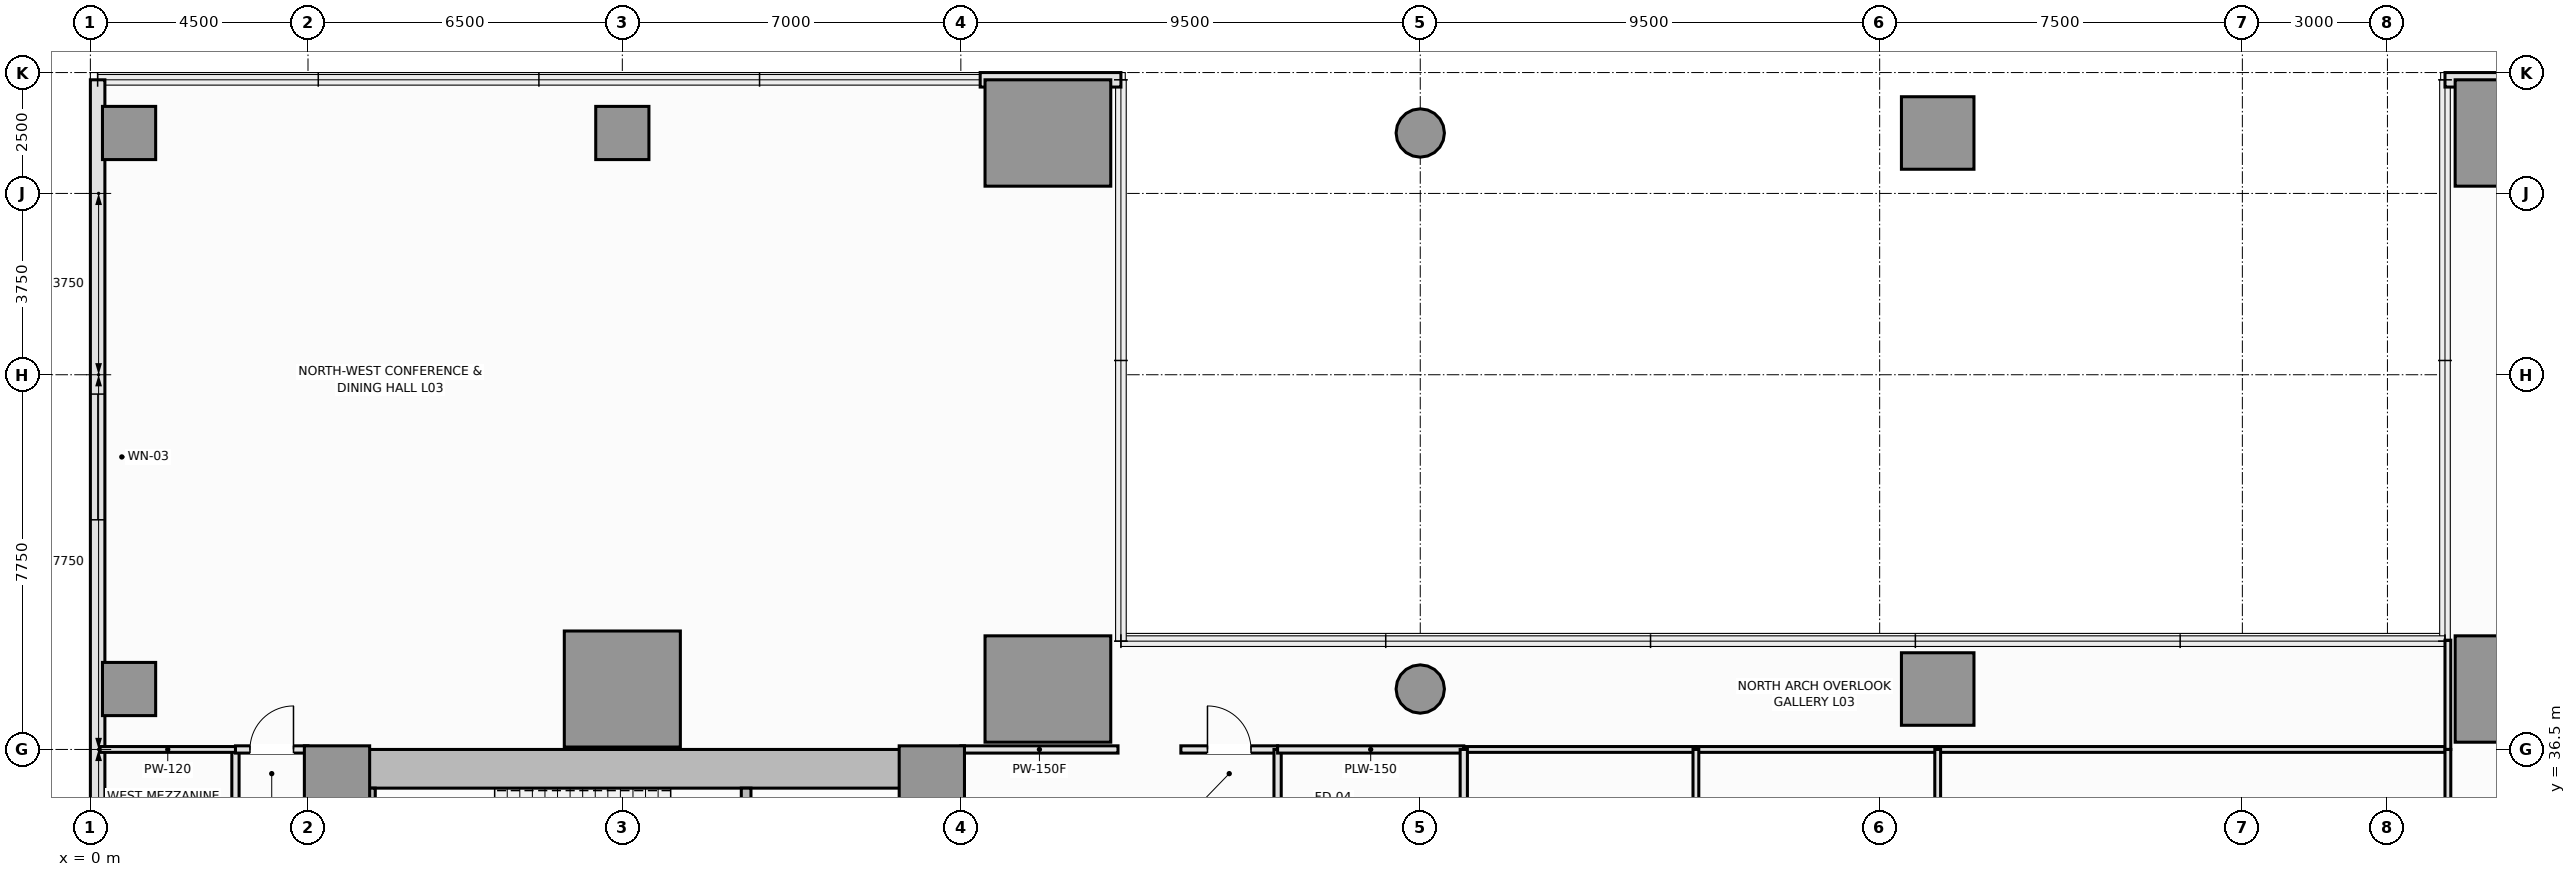
"""IFC4 building model, lengths in metres.
Left out: names, types, materials, properties, quantities, classifications, styles, units other than length and angle.
Written with IfcOpenShell. Run it as: python <this file> out.ifc"""

import sys

from ifc_helpers import new_model, si_unit, direction, frame, frame_2d, origin, origin_2d, place, context, subcontext, project, spatial, rectangle, circle, extrude, element, fill, save


model = new_model("IFC4")
c1 = context("Model", 3, precision=1e-05, world=origin(), true_north=direction((0.0, 1.0)))
c2 = subcontext(c1, "Body", "Model", "MODEL_VIEW")
j1 = project(units=[si_unit("LENGTHUNIT", "METRE"), si_unit("PLANEANGLEUNIT", "RADIAN")], contexts=[c1])
p1 = place(None, origin())
s1 = spatial("IfcSite", under=j1, at=p1, CompositionType="ELEMENT")
p2 = place(p1, origin())
s2 = spatial("IfcBuilding", under=s1, at=p2, CompositionType="ELEMENT")
p3 = place(p2, frame((0.0, 0.0, 15.6)))
s3 = spatial("IfcBuildingStorey", under=s2, at=p3, CompositionType="ELEMENT", Elevation=15.6)
p4 = place(p3, frame((4.5, 36.1, 0.0), z_axis=(0.0, 0.0, 1.0), x_axis=(1.0, 0.0, 0.0)))
e1 = element("IfcWall", 1, at=p4, inside=s3, PredefinedType="SHEAR", context=c2, shape_type="SweptSolid", body=[
    extrude(rectangle(XDim=13.5, YDim=0.8, at=frame_2d((6.75, 0.0))), origin(), (0.0, 0.0, 1.0), 4.8),
])
p5 = place(p3, frame((4.9, 14.8, 0.0), z_axis=(0.0, 0.0, 1.0), x_axis=(0.0, 1.0, 0.0)))
e2 = element("IfcWall", 2, at=p5, inside=s3, PredefinedType="SHEAR", context=c2, shape_type="SweptSolid", body=[
    extrude(rectangle(XDim=20.9, YDim=0.8, at=frame_2d((10.45, 0.0))), origin(), (0.0, 0.0, 1.0), 4.8),
])
p6 = place(p3, frame((17.6, 27.05, 0.0), z_axis=(0.0, 0.0, 1.0), x_axis=(0.0, 1.0, 0.0)))
e3 = element("IfcWall", 3, at=p6, inside=s3, PredefinedType="SHEAR", context=c2, shape_type="SweptSolid", body=[
    extrude(rectangle(XDim=8.65, YDim=0.8, at=frame_2d((4.325, 0.0))), origin(), (0.0, 0.0, 1.0), 4.8),
])
p7 = place(p6, frame((3.45, 0.0, 0.0)))
e4 = element("IfcOpeningElement", 4, at=p7, cuts=e3, PredefinedType="OPENING", context=c2, shape_type="SweptSolid", body=[
    extrude(rectangle(XDim=1.1, YDim=2.15, at=frame_2d((0.55, 1.075))), frame((0.0, 0.41, 0.0), z_axis=(0.0, -1.0, 0.0), x_axis=(1.0, 0.0, 0.0)), (0.0, 0.0, 1.0), 0.82),
])
for number, where, z_axis, x_axis in (
    (5, (5.1, 35.9, 0.0), (0.0, 0.0, 1.0), (1.0, 0.0, 0.0)),
    (6, (17.4, 35.9, 0.0), (0.0, 0.0, 1.0), (1.0, 0.0, 0.0)),
):
    element("IfcColumn", number, at=place(p3, frame(where, z_axis=z_axis, x_axis=x_axis)), inside=s3, PredefinedType="PILASTER", context=c2, shape_type="SweptSolid", body=[
        extrude(rectangle(XDim=1.35, YDim=1.35, at=origin_2d()), origin(), (0.0, 0.0, 1.0), 4.8),
    ])
p8 = place(p3, frame((11.0, 37.75, 0.0), z_axis=(0.0, 0.0, 1.0), x_axis=(1.0, 0.0, 0.0)))
e7 = element("IfcColumn", 7, at=p8, inside=s3, PredefinedType="COLUMN", context=c2, shape_type="SweptSolid", body=[
    extrude(rectangle(XDim=2.4, YDim=2.4, at=origin_2d()), origin(), (0.0, 0.0, 1.0), 4.8),
])
for number, where, z_axis, x_axis in (
    (8, (19.8, 37.75, 0.0), (0.0, 0.0, 1.0), (1.0, 0.0, 0.0)),
    (9, (50.2, 37.75, 0.0), (0.0, 0.0, 1.0), (1.0, 0.0, 0.0)),
    (10, (19.8, 49.25, 0.0), (0.0, 0.0, 1.0), (1.0, 0.0, 0.0)),
    (11, (50.2, 49.25, 0.0), (0.0, 0.0, 1.0), (1.0, 0.0, 0.0)),
):
    element("IfcColumn", number, at=place(p3, frame(where, z_axis=z_axis, x_axis=x_axis)), inside=s3, PredefinedType="COLUMN", context=c2, shape_type="SweptSolid", body=[
        extrude(rectangle(XDim=2.6, YDim=2.2, at=origin_2d()), origin(), (0.0, 0.0, 1.0), 4.8),
    ])
for number, where, z_axis, x_axis in (
    (12, (0.8, 37.75, 0.0), (0.0, 0.0, 1.0), (1.0, 0.0, 0.0)),
    (13, (0.8, 49.25, 0.0), (0.0, 0.0, 1.0), (1.0, 0.0, 0.0)),
    (14, (11.0, 49.25, 0.0), (0.0, 0.0, 1.0), (1.0, 0.0, 0.0)),
):
    element("IfcColumn", number, at=place(p3, frame(where, z_axis=z_axis, x_axis=x_axis)), inside=s3, PredefinedType="COLUMN", context=c2, shape_type="SweptSolid", body=[
        extrude(rectangle(XDim=1.1, YDim=1.1, at=origin_2d()), origin(), (0.0, 0.0, 1.0), 4.8),
    ])
p9 = place(p3, frame((27.5, 37.75, 0.0), z_axis=(0.0, 0.0, 1.0), x_axis=(1.0, 0.0, 0.0)))
e15 = element("IfcColumn", 15, at=p9, inside=s3, PredefinedType="COLUMN", context=c2, shape_type="SweptSolid", body=[
    extrude(circle(Radius=0.5, at=origin_2d()), origin(), (0.0, 0.0, 1.0), 4.8),
])
p10 = place(p3, frame((38.2, 37.75, 0.8), z_axis=(0.0, 0.0, 1.0), x_axis=(1.0, 0.0, 0.0)))
e16 = element("IfcColumn", 16, at=p10, inside=s3, PredefinedType="COLUMN", context=c2, shape_type="SweptSolid", body=[
    extrude(rectangle(XDim=1.5, YDim=1.5, at=origin_2d()), origin(), (0.0, 0.0, 1.0), 4.0),
])
p11 = place(p3, frame((27.5, 49.25, 0.0), z_axis=(0.0, 0.0, 1.0), x_axis=(1.0, 0.0, 0.0)))
e17 = element("IfcColumn", 17, at=p11, inside=s3, PredefinedType="COLUMN", context=c2, shape_type="SweptSolid", body=[
    extrude(circle(Radius=0.5, at=origin_2d()), origin(), (0.0, 0.0, 1.0), 4.8),
])
p12 = place(p3, frame((38.2, 49.25, 0.8), z_axis=(0.0, 0.0, 1.0), x_axis=(1.0, 0.0, 0.0)))
e18 = element("IfcColumn", 18, at=p12, inside=s3, PredefinedType="COLUMN", context=c2, shape_type="SweptSolid", body=[
    extrude(rectangle(XDim=1.5, YDim=1.5, at=origin_2d()), origin(), (0.0, 0.0, 1.0), 4.0),
])
p13 = place(p3, frame((0.15, 50.35, 0.0), z_axis=(0.0, 0.0, 1.0), x_axis=(0.0, -1.0, 0.0)))
e19 = element("IfcWall", 19, at=p13, inside=s3, PredefinedType="SOLIDWALL", context=c2, shape_type="SweptSolid", body=[
    extrude(rectangle(XDim=50.2, YDim=0.3, at=frame_2d((25.1, 0.0))), origin(), (0.0, 0.0, 1.0), 4.6),
])
p14 = place(p13, frame((6.5, 0.0, 0.9)))
e20 = element("IfcOpeningElement", 20, at=p14, cuts=e19, PredefinedType="OPENING", context=c2, shape_type="SweptSolid", body=[
    extrude(rectangle(XDim=2.6, YDim=2.2, at=frame_2d((1.3, 1.1))), frame((0.0, 0.16, 0.0), z_axis=(0.0, -1.0, 0.0), x_axis=(1.0, 0.0, 0.0)), (0.0, 0.0, 1.0), 0.32),
])
p15 = place(p13, frame((42.0, 0.0, 0.9)))
e21 = element("IfcOpeningElement", 21, at=p15, cuts=e19, PredefinedType="OPENING", context=c2, shape_type="SweptSolid", body=[
    extrude(rectangle(XDim=2.6, YDim=2.2, at=frame_2d((1.3, 1.1))), frame((0.0, 0.16, 0.0), z_axis=(0.0, -1.0, 0.0), x_axis=(1.0, 0.0, 0.0)), (0.0, 0.0, 1.0), 0.32),
])
for number, where, z_axis, x_axis in (
    (22, (51.6, 50.35, 0.0), (0.0, 0.0, 1.0), (-1.0, 0.0, 0.0)),
    (23, (21.31, 50.35, 0.0), (0.0, 0.0, 1.0), (-1.0, 0.0, 0.0)),
):
    element("IfcWall", number, at=place(p3, frame(where, z_axis=z_axis, x_axis=x_axis)), inside=s3, PredefinedType="SOLIDWALL", context=c2, shape_type="SweptSolid", body=[
        extrude(rectangle(XDim=2.91, YDim=0.3, at=frame_2d((1.455, 0.0))), origin(), (0.0, 0.0, 1.0), 4.6),
    ])
p16 = place(p3, frame((5.79, 32.65, 0.0), z_axis=(0.0, 0.0, 1.0), x_axis=(0.0, 1.0, 0.0)))
e24 = element("IfcWall", 24, at=p16, inside=s3, PredefinedType="SOLIDWALL", context=c2, shape_type="SweptSolid", body=[
    extrude(rectangle(XDim=3.05, YDim=0.2, at=frame_2d((1.525, 0.0))), origin(), (0.0, 0.0, 1.0), 4.8),
])
p17 = place(p3, frame((13.56, 32.65, 0.0), z_axis=(0.0, 0.0, 1.0), x_axis=(0.0, 1.0, 0.0)))
e25 = element("IfcWall", 25, at=p17, inside=s3, PredefinedType="SOLIDWALL", context=c2, shape_type="SweptSolid", body=[
    extrude(rectangle(XDim=3.05, YDim=0.2, at=frame_2d((1.525, 0.0))), origin(), (0.0, 0.0, 1.0), 4.8),
])
p18 = place(p17, frame((0.95, 0.0, 0.0)))
e26 = element("IfcOpeningElement", 26, at=p18, cuts=e25, PredefinedType="OPENING", context=c2, shape_type="SweptSolid", body=[
    extrude(rectangle(XDim=1.15, YDim=2.15, at=frame_2d((0.575, 1.075))), frame((0.0, 0.11, 0.0), z_axis=(0.0, -1.0, 0.0), x_axis=(1.0, 0.0, 0.0)), (0.0, 0.0, 1.0), 0.22),
])
p19 = place(p3, frame((18.0, 36.5, 0.0), z_axis=(0.0, 0.0, 1.0), x_axis=(1.0, 0.0, 0.0)))
e27 = element("IfcWall", 27, at=p19, inside=s3, PredefinedType="PARTITIONING", context=c2, shape_type="SweptSolid", body=[
    extrude(rectangle(XDim=3.25, YDim=0.15, at=frame_2d((1.625, 0.0))), origin(), (0.0, 0.0, 1.0), 4.6),
])
p20 = place(p3, frame((22.55, 36.5, 0.0), z_axis=(0.0, 0.0, 1.0), x_axis=(1.0, 0.0, 0.0)))
e28 = element("IfcWall", 28, at=p20, inside=s3, PredefinedType="PARTITIONING", context=c2, shape_type="SweptSolid", body=[
    extrude(rectangle(XDim=2.0, YDim=0.15, at=frame_2d((1.0, 0.0))), origin(), (0.0, 0.0, 1.0), 4.6),
])
p21 = place(p20, frame((0.55, 0.0, 0.0)))
e29 = element("IfcOpeningElement", 29, at=p21, cuts=e28, PredefinedType="OPENING", context=c2, shape_type="SweptSolid", body=[
    extrude(rectangle(XDim=0.9, YDim=2.1, at=frame_2d((0.45, 1.05))), frame((0.0, 0.085, 0.0), z_axis=(0.0, -1.0, 0.0), x_axis=(1.0, 0.0, 0.0)), (0.0, 0.0, 1.0), 0.17),
])
p22 = place(p3, frame((24.55, 33.4, 0.0), z_axis=(0.0, 0.0, 1.0), x_axis=(0.0, 1.0, 0.0)))
e30 = element("IfcWall", 30, at=p22, inside=s3, PredefinedType="PLUMBINGWALL", context=c2, shape_type="SweptSolid", body=[
    extrude(rectangle(XDim=3.1, YDim=0.15, at=frame_2d((1.55, 0.0))), origin(), (0.0, 0.0, 1.0), 4.6),
])
p23 = place(p22, frame((1.1, 0.0, 0.0)))
e31 = element("IfcOpeningElement", 31, at=p23, cuts=e30, PredefinedType="OPENING", context=c2, shape_type="SweptSolid", body=[
    extrude(rectangle(XDim=0.9, YDim=2.1, at=frame_2d((0.45, 1.05))), frame((0.0, 0.085, 0.0), z_axis=(0.0, -1.0, 0.0), x_axis=(1.0, 0.0, 0.0)), (0.0, 0.0, 1.0), 0.17),
])
p24 = place(p3, frame((3.0, 25.25, 0.0), z_axis=(0.0, 0.0, 1.0), x_axis=(0.0, 1.0, 0.0)))
e32 = element("IfcWall", 32, at=p24, inside=s3, PredefinedType="PARTITIONING", context=c2, shape_type="SweptSolid", body=[
    extrude(rectangle(XDim=11.25, YDim=0.15, at=frame_2d((5.625, 0.0))), origin(), (0.0, 0.0, 1.0), 4.6),
])
p25 = place(p24, frame((5.125, 0.0, 0.0)))
e33 = element("IfcOpeningElement", 33, at=p25, cuts=e32, PredefinedType="OPENING", context=c2, shape_type="SweptSolid", body=[
    extrude(rectangle(XDim=1.0, YDim=2.15, at=frame_2d((0.5, 1.075))), frame((0.0, 0.085, 0.0), z_axis=(0.0, -1.0, 0.0), x_axis=(1.0, 0.0, 0.0)), (0.0, 0.0, 1.0), 0.17),
])
p26 = place(p3, frame((3.0, 36.5, 0.0), z_axis=(0.0, 0.0, 1.0), x_axis=(1.0, 0.0, 0.0)))
e34 = element("IfcWall", 34, at=p26, inside=s3, PredefinedType="PARTITIONING", context=c2, shape_type="SweptSolid", body=[
    extrude(rectangle(XDim=1.5, YDim=0.15, at=frame_2d((0.75, 0.0))), origin(), (0.0, 0.0, 1.0), 4.6),
])
p27 = place(p26, frame((0.3, 0.0, 0.0)))
e35 = element("IfcOpeningElement", 35, at=p27, cuts=e34, PredefinedType="OPENING", context=c2, shape_type="SweptSolid", body=[
    extrude(rectangle(XDim=0.9, YDim=2.1, at=frame_2d((0.45, 1.05))), frame((0.0, 0.085, 0.0), z_axis=(0.0, -1.0, 0.0), x_axis=(1.0, 0.0, 0.0)), (0.0, 0.0, 1.0), 0.17),
])
p28 = place(p3, frame((0.2, 36.5, 0.0), z_axis=(0.0, 0.0, 1.0), x_axis=(1.0, 0.0, 0.0)))
e36 = element("IfcWall", 36, at=p28, inside=s3, PredefinedType="PARTITIONING", context=c2, shape_type="SweptSolid", body=[
    extrude(rectangle(XDim=2.8, YDim=0.12, at=frame_2d((1.4, 0.0))), origin(), (0.0, 0.0, 1.0), 4.6),
])
p29 = place(p3, frame((24.55, 36.5, 0.0), z_axis=(0.0, 0.0, 1.0), x_axis=(1.0, 0.0, 0.0)))
e37 = element("IfcWall", 37, at=p29, inside=s3, PredefinedType="PLUMBINGWALL", context=c2, shape_type="SweptSolid", body=[
    extrude(rectangle(XDim=3.85, YDim=0.15, at=frame_2d((1.925, 0.0))), origin(), (0.0, 0.0, 1.0), 4.6),
])
p30 = place(p3, frame((28.4, 36.5, 0.0), z_axis=(0.0, 0.0, 1.0), x_axis=(1.0, 0.0, 0.0)))
e38 = element("IfcWall", 38, at=p30, inside=s3, PredefinedType="PARTITIONING", context=c2, shape_type="SweptSolid", body=[
    extrude(rectangle(XDim=4.8, YDim=0.12, at=frame_2d((2.4, 0.0))), origin(), (0.0, 0.0, 1.0), 4.6),
])
p31 = place(p3, frame((33.2, 36.5, 0.0), z_axis=(0.0, 0.0, 1.0), x_axis=(1.0, 0.0, 0.0)))
e39 = element("IfcWall", 39, at=p31, inside=s3, PredefinedType="PARTITIONING", context=c2, shape_type="SweptSolid", body=[
    extrude(rectangle(XDim=5.0, YDim=0.12, at=frame_2d((2.5, 0.0))), origin(), (0.0, 0.0, 1.0), 4.6),
])
p32 = place(p3, frame((38.2, 36.5, 0.0), z_axis=(0.0, 0.0, 1.0), x_axis=(1.0, 0.0, 0.0)))
e40 = element("IfcWall", 40, at=p32, inside=s3, PredefinedType="PARTITIONING", context=c2, shape_type="SweptSolid", body=[
    extrude(rectangle(XDim=10.55, YDim=0.12, at=frame_2d((5.275, 0.0))), origin(), (0.0, 0.0, 1.0), 4.6),
])
p33 = place(p3, frame((48.75, 36.5, 0.0), z_axis=(0.0, 0.0, 1.0), x_axis=(0.0, 1.0, 0.0)))
e41 = element("IfcWall", 41, at=p33, inside=s3, PredefinedType="PARTITIONING", context=c2, shape_type="SweptSolid", body=[
    extrude(rectangle(XDim=2.26, YDim=0.12, at=frame_2d((1.13, 0.0))), origin(), (0.0, 0.0, 1.0), 4.6),
])
p34 = place(p3, frame((28.4, 33.4, 0.0), z_axis=(0.0, 0.0, 1.0), x_axis=(0.0, 1.0, 0.0)))
e42 = element("IfcWall", 42, at=p34, inside=s3, PredefinedType="PLUMBINGWALL", context=c2, shape_type="SweptSolid", body=[
    extrude(rectangle(XDim=3.1, YDim=0.15, at=frame_2d((1.55, 0.0))), origin(), (0.0, 0.0, 1.0), 4.6),
])
p35 = place(p3, frame((33.2, 21.7, 0.0), z_axis=(0.0, 0.0, 1.0), x_axis=(0.0, 1.0, 0.0)))
e43 = element("IfcWall", 43, at=p35, inside=s3, PredefinedType="PARTITIONING", context=c2, shape_type="SweptSolid", body=[
    extrude(rectangle(XDim=14.8, YDim=0.12, at=frame_2d((7.4, 0.0))), origin(), (0.0, 0.0, 1.0), 4.6),
])
p36 = place(p3, frame((38.2, 21.7, 0.0), z_axis=(0.0, 0.0, 1.0), x_axis=(0.0, 1.0, 0.0)))
e44 = element("IfcWall", 44, at=p36, inside=s3, PredefinedType="PARTITIONING", context=c2, shape_type="SweptSolid", body=[
    extrude(rectangle(XDim=14.8, YDim=0.12, at=frame_2d((7.4, 0.0))), origin(), (0.0, 0.0, 1.0), 4.0),
])
p37 = place(p3, frame((48.75, 21.7, 0.0), z_axis=(0.0, 0.0, 1.0), x_axis=(0.0, 1.0, 0.0)))
e45 = element("IfcWall", 45, at=p37, inside=s3, PredefinedType="PARTITIONING", context=c2, shape_type="SweptSolid", body=[
    extrude(rectangle(XDim=14.8, YDim=0.12, at=frame_2d((7.4, 0.0))), origin(), (0.0, 0.0, 1.0), 4.6),
])
p38 = place(p14, origin())
e46 = element("IfcWindow", 46, at=p38, inside=s3, PartitioningType="SINGLE_PANEL", PredefinedType="WINDOW", context=c2, shape_type="SweptSolid", body=[
    extrude(rectangle(XDim=2.6, YDim=2.2, at=frame_2d((1.3, 1.1))), frame((0.0, 0.03, 0.0), z_axis=(0.0, -1.0, 0.0), x_axis=(1.0, 0.0, 0.0)), (0.0, 0.0, 1.0), 0.06),
])
fill(e20, e46)
p39 = place(p21, origin())
e47 = element("IfcDoor", 47, at=p39, inside=s3, OperationType="SINGLE_SWING_LEFT", PredefinedType="DOOR", context=c2, shape_type="SweptSolid", body=[
    extrude(rectangle(XDim=0.9, YDim=2.1, at=frame_2d((0.45, 1.05))), frame((0.0, 0.025, 0.0), z_axis=(0.0, -1.0, 0.0), x_axis=(1.0, 0.0, 0.0)), (0.0, 0.0, 1.0), 0.05),
])
fill(e29, e47)
p40 = place(p27, origin())
e48 = element("IfcDoor", 48, at=p40, inside=s3, OperationType="SINGLE_SWING_RIGHT", PredefinedType="DOOR", context=c2, shape_type="SweptSolid", body=[
    extrude(rectangle(XDim=0.9, YDim=2.1, at=frame_2d((0.45, 1.05))), frame((0.0, 0.025, 0.0), z_axis=(0.0, -1.0, 0.0), x_axis=(1.0, 0.0, 0.0)), (0.0, 0.0, 1.0), 0.05),
])
fill(e35, e48)
save(model, sys.argv[1])
